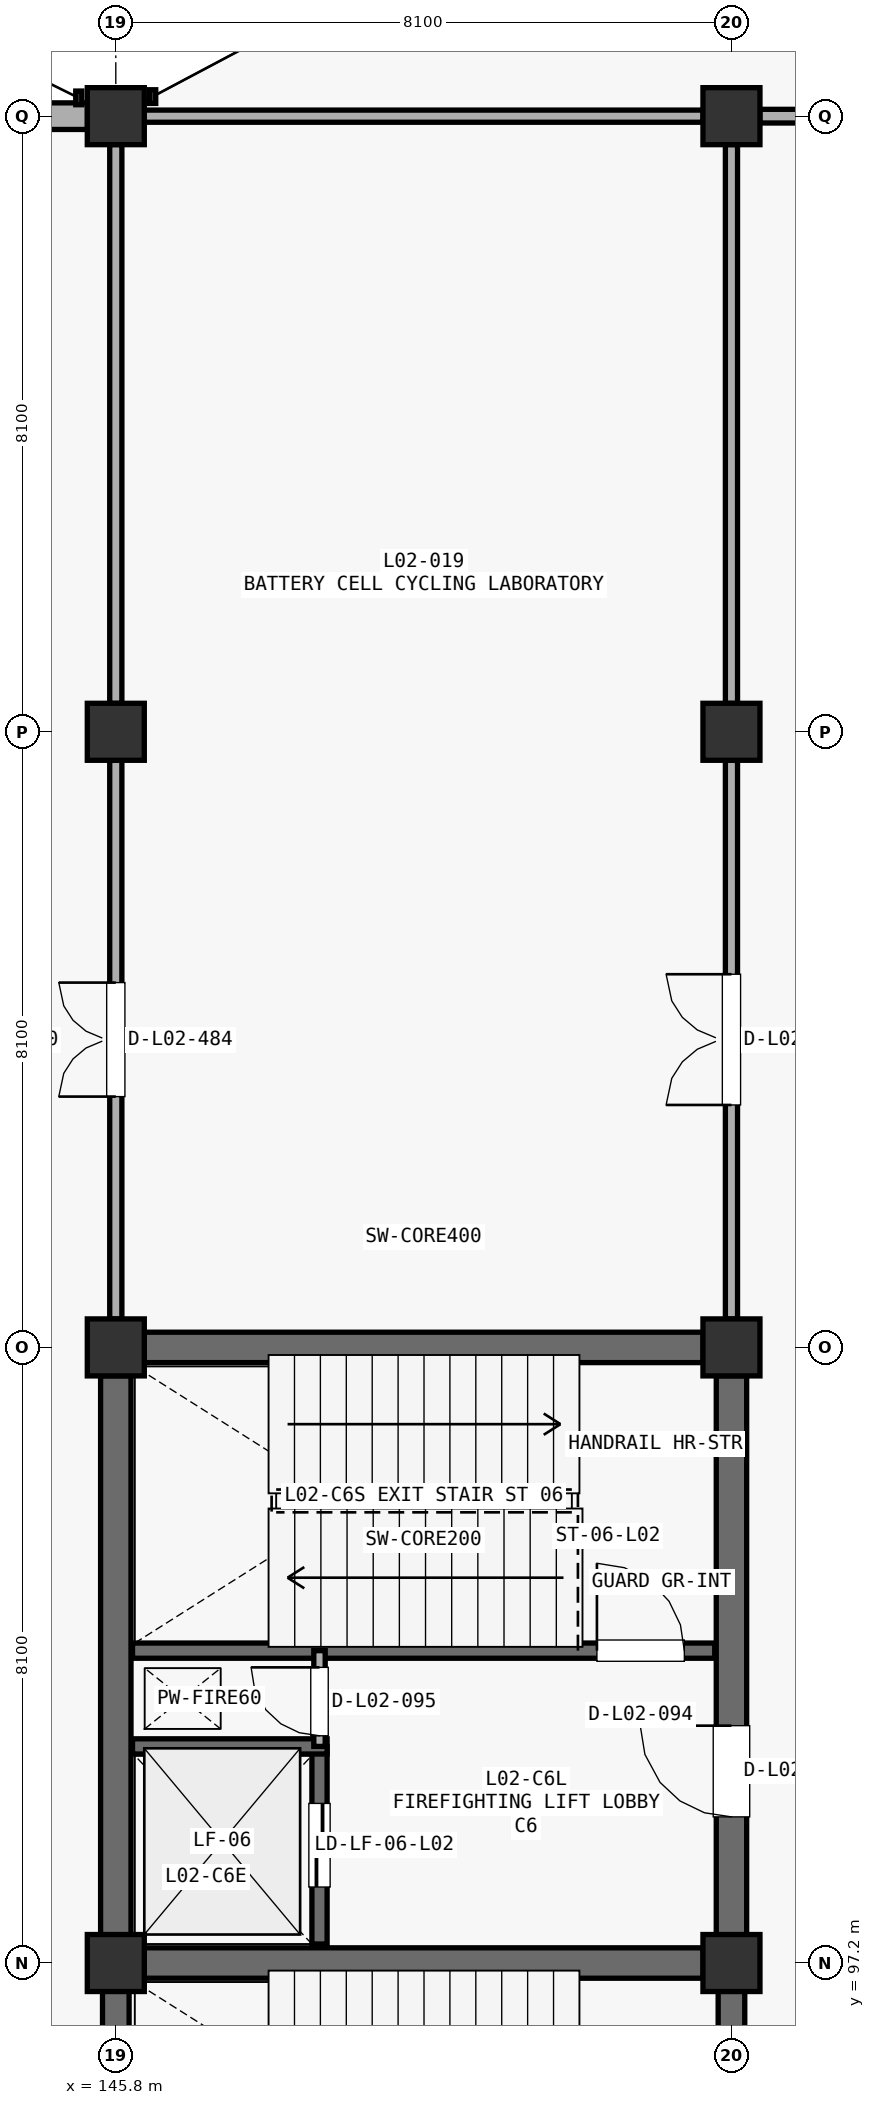
"""IFC4 building model, lengths in metres.
Left out: names, types, materials, properties, quantities, classifications, styles, units other than length and angle.
Written with IfcOpenShell. Run it as: python <this file> out.ifc"""

import sys

from ifc_helpers import new_model, si_unit, direction, frame, frame_2d, origin, origin_2d, place, context, subcontext, project, spatial, rectangle, extrude, element, fill, save


model = new_model("IFC4")
c1 = context("Model", 3, precision=1e-05, world=origin(), true_north=direction((0.0, 1.0)))
c2 = subcontext(c1, "Body", "Model", "MODEL_VIEW")
j1 = project(units=[si_unit("LENGTHUNIT", "METRE"), si_unit("PLANEANGLEUNIT", "RADIAN")], contexts=[c1])
p1 = place(None, origin())
s1 = spatial("IfcSite", under=j1, at=p1, CompositionType="ELEMENT")
p2 = place(p1, origin())
s2 = spatial("IfcBuilding", under=s1, at=p2, CompositionType="ELEMENT")
p3 = place(p2, frame((0.0, 0.0, 9.69)))
s3 = spatial("IfcBuildingStorey", under=s2, at=p3, CompositionType="ELEMENT", Elevation=9.69)
for number, where, z_axis, x_axis in (
    (1, (145.8, 97.2, 0.0), (0.0, 0.0, 1.0), (1.0, 0.0, 0.0)),
    (2, (145.8, 105.3, 0.0), (0.0, 0.0, 1.0), (1.0, 0.0, 0.0)),
    (3, (145.8, 113.4, 0.0), (0.0, 0.0, 1.0), (1.0, 0.0, 0.0)),
    (4, (145.8, 121.5, 0.0), (0.0, 0.0, 1.0), (1.0, 0.0, 0.0)),
    (5, (153.9, 97.2, 0.0), (0.0, 0.0, 1.0), (1.0, 0.0, 0.0)),
    (6, (153.9, 105.3, 0.0), (0.0, 0.0, 1.0), (1.0, 0.0, 0.0)),
    (7, (153.9, 113.4, 0.0), (0.0, 0.0, 1.0), (1.0, 0.0, 0.0)),
    (8, (153.9, 121.5, 0.0), (0.0, 0.0, 1.0), (1.0, 0.0, 0.0)),
):
    element("IfcColumn", number, at=place(p3, frame(where, z_axis=z_axis, x_axis=x_axis)), inside=s3, PredefinedType="COLUMN", context=c2, shape_type="SweptSolid", body=[
        extrude(rectangle(XDim=0.75, YDim=0.75, at=origin_2d()), origin(), (0.0, 0.0, 1.0), 4.42),
    ])
p4 = place(p3, frame((138.073, 121.5, 0.0), z_axis=(0.0, 0.0, 1.0), x_axis=(1.0, 0.0, 0.0)))
e9 = element("IfcWall", 9, at=p4, inside=s3, PredefinedType="STANDARD", context=c2, shape_type="SweptSolid", body=[
    extrude(rectangle(XDim=7.354, YDim=0.35, at=frame_2d((3.677, 0.0))), origin(), (0.0, 0.0, 1.0), 3.392),
])
p5 = place(p4, frame((2.652, 0.0, 0.85)))
e10 = element("IfcOpeningElement", 10, at=p5, cuts=e9, PredefinedType="OPENING", context=c2, shape_type="SweptSolid", body=[
    extrude(rectangle(XDim=2.05, YDim=1.6, at=frame_2d((1.025, 0.8))), frame((0.0, 0.185, 0.0), z_axis=(0.0, -1.0, 0.0), x_axis=(1.0, 0.0, 0.0)), (0.0, 0.0, 1.0), 0.37),
])
for number, where, z_axis, x_axis in (
    (11, (146.173, 105.3, 0.0), (0.0, 0.0, 1.0), (1.0, 0.0, 0.0)),
    (12, (145.8, 97.573, 0.0), (0.0, 0.0, 1.0), (0.0, 1.0, 0.0)),
):
    element("IfcWall", number, at=place(p3, frame(where, z_axis=z_axis, x_axis=x_axis)), inside=s3, PredefinedType="SHEAR", context=c2, shape_type="SweptSolid", body=[
        extrude(rectangle(XDim=7.354, YDim=0.4, at=frame_2d((3.677, 0.0))), origin(), (0.0, 0.0, 1.0), 4.142),
    ])
p6 = place(p3, frame((153.9, 97.573, 0.0), z_axis=(0.0, 0.0, 1.0), x_axis=(0.0, 1.0, 0.0)))
e13 = element("IfcWall", 13, at=p6, inside=s3, PredefinedType="SHEAR", context=c2, shape_type="SweptSolid", body=[
    extrude(rectangle(XDim=7.354, YDim=0.4, at=frame_2d((3.677, 0.0))), origin(), (0.0, 0.0, 1.0), 4.142),
])
p7 = place(p6, frame((1.55, 0.0, 0.0)))
e14 = element("IfcOpeningElement", 14, at=p7, cuts=e13, PredefinedType="OPENING", context=c2, shape_type="SweptSolid", body=[
    extrude(rectangle(XDim=1.2, YDim=2.2, at=frame_2d((0.6, 1.1))), frame((0.0, 0.21, 0.0), z_axis=(0.0, -1.0, 0.0), x_axis=(1.0, 0.0, 0.0)), (0.0, 0.0, 1.0), 0.42),
])
p8 = place(p3, frame((146.173, 97.2, 0.0), z_axis=(0.0, 0.0, 1.0), x_axis=(1.0, 0.0, 0.0)))
e15 = element("IfcWall", 15, at=p8, inside=s3, PredefinedType="SHEAR", context=c2, shape_type="SweptSolid", body=[
    extrude(rectangle(XDim=7.354, YDim=0.4, at=frame_2d((3.677, 0.0))), origin(), (0.0, 0.0, 1.0), 4.142),
])
p9 = place(p3, frame((146.02, 101.31, 0.0), z_axis=(0.0, 0.0, 1.0), x_axis=(1.0, 0.0, 0.0)))
e16 = element("IfcWall", 16, at=p9, inside=s3, PredefinedType="SHEAR", context=c2, shape_type="SweptSolid", body=[
    extrude(rectangle(XDim=7.66, YDim=0.2, at=frame_2d((3.83, 0.0))), origin(), (0.0, 0.0, 1.0), 4.142),
])
p10 = place(p9, frame((6.11, 0.0, 0.0)))
e17 = element("IfcOpeningElement", 17, at=p10, cuts=e16, PredefinedType="OPENING", context=c2, shape_type="SweptSolid", body=[
    extrude(rectangle(XDim=1.15, YDim=2.2, at=frame_2d((0.575, 1.1))), frame((0.0, 0.11, 0.0), z_axis=(0.0, -1.0, 0.0), x_axis=(1.0, 0.0, 0.0)), (0.0, 0.0, 1.0), 0.22),
])
p11 = place(p3, frame((148.48, 97.45, 0.0), z_axis=(0.0, 0.0, 1.0), x_axis=(0.0, 1.0, 0.0)))
e18 = element("IfcWall", 18, at=p11, inside=s3, PredefinedType="SHEAR", context=c2, shape_type="SweptSolid", body=[
    extrude(rectangle(XDim=2.6, YDim=0.2, at=frame_2d((1.3, 0.0))), origin(), (0.0, 0.0, 1.0), 4.142),
])
p12 = place(p11, frame((0.75, 0.0, 0.0)))
e19 = element("IfcOpeningElement", 19, at=p12, cuts=e18, PredefinedType="OPENING", context=c2, shape_type="SweptSolid", body=[
    extrude(rectangle(XDim=1.1, YDim=2.2, at=frame_2d((0.55, 1.1))), frame((0.0, 0.11, 0.0), z_axis=(0.0, -1.0, 0.0), x_axis=(1.0, 0.0, 0.0)), (0.0, 0.0, 1.0), 0.22),
])
p13 = place(p3, frame((146.02, 100.05, 0.0), z_axis=(0.0, 0.0, 1.0), x_axis=(1.0, 0.0, 0.0)))
e20 = element("IfcWall", 20, at=p13, inside=s3, PredefinedType="SHEAR", context=c2, shape_type="SweptSolid", body=[
    extrude(rectangle(XDim=2.56, YDim=0.2, at=frame_2d((1.28, 0.0))), origin(), (0.0, 0.0, 1.0), 4.142),
])
p14 = place(p3, frame((148.48, 100.05, 0.0), z_axis=(0.0, 0.0, 1.0), x_axis=(0.0, 1.0, 0.0)))
e21 = element("IfcWall", 21, at=p14, inside=s3, PredefinedType="PARTITIONING", context=c2, shape_type="SweptSolid", body=[
    extrude(rectangle(XDim=1.26, YDim=0.15, at=frame_2d((0.63, 0.0))), origin(), (0.0, 0.0, 1.0), 4.142),
])
p15 = place(p14, frame((0.14, 0.0, 0.0)))
e22 = element("IfcOpeningElement", 22, at=p15, cuts=e21, PredefinedType="OPENING", context=c2, shape_type="SweptSolid", body=[
    extrude(rectangle(XDim=0.9, YDim=2.15, at=frame_2d((0.45, 1.075))), frame((0.0, 0.085, 0.0), z_axis=(0.0, -1.0, 0.0), x_axis=(1.0, 0.0, 0.0)), (0.0, 0.0, 1.0), 0.17),
])
p16 = place(p3, frame((145.8, 89.473, 0.0), z_axis=(0.0, 0.0, 1.0), x_axis=(0.0, 1.0, 0.0)))
e23 = element("IfcWall", 23, at=p16, inside=s3, PredefinedType="SHEAR", context=c2, shape_type="SweptSolid", body=[
    extrude(rectangle(XDim=7.354, YDim=0.35, at=frame_2d((3.677, 0.0))), origin(), (0.0, 0.0, 1.0), 4.142),
])
p17 = place(p3, frame((153.9, 89.473, 0.0), z_axis=(0.0, 0.0, 1.0), x_axis=(0.0, 1.0, 0.0)))
e24 = element("IfcWall", 24, at=p17, inside=s3, PredefinedType="SHEAR", context=c2, shape_type="SweptSolid", body=[
    extrude(rectangle(XDim=7.354, YDim=0.35, at=frame_2d((3.677, 0.0))), origin(), (0.0, 0.0, 1.0), 4.142),
])
p18 = place(p17, frame((1.55, 0.0, 0.0)))
e25 = element("IfcOpeningElement", 25, at=p18, cuts=e24, PredefinedType="OPENING", context=c2, shape_type="SweptSolid", body=[
    extrude(rectangle(XDim=1.2, YDim=2.2, at=frame_2d((0.6, 1.1))), frame((0.0, 0.185, 0.0), z_axis=(0.0, -1.0, 0.0), x_axis=(1.0, 0.0, 0.0)), (0.0, 0.0, 1.0), 0.37),
])
p19 = place(p3, frame((145.8, 105.673, 0.0), z_axis=(0.0, 0.0, 1.0), x_axis=(0.0, 1.0, 0.0)))
e26 = element("IfcWall", 26, at=p19, inside=s3, PredefinedType="PARTITIONING", context=c2, shape_type="SweptSolid", body=[
    extrude(rectangle(XDim=7.354, YDim=0.16, at=frame_2d((3.677, 0.0))), origin(), (0.0, 0.0, 1.0), 3.542),
])
p20 = place(p19, frame((2.927, 0.0, 0.0)))
e27 = element("IfcOpeningElement", 27, at=p20, cuts=e26, PredefinedType="OPENING", context=c2, shape_type="SweptSolid", body=[
    extrude(rectangle(XDim=1.5, YDim=2.2, at=frame_2d((0.75, 1.1))), frame((0.0, 0.09, 0.0), z_axis=(0.0, -1.0, 0.0), x_axis=(1.0, 0.0, 0.0)), (0.0, 0.0, 1.0), 0.18),
])
p21 = place(p3, frame((145.8, 113.773, 0.0), z_axis=(0.0, 0.0, 1.0), x_axis=(0.0, 1.0, 0.0)))
e28 = element("IfcWall", 28, at=p21, inside=s3, PredefinedType="PARTITIONING", context=c2, shape_type="SweptSolid", body=[
    extrude(rectangle(XDim=7.354, YDim=0.16, at=frame_2d((3.677, 0.0))), origin(), (0.0, 0.0, 1.0), 3.292),
])
p22 = place(p3, frame((153.9, 105.673, 0.0), z_axis=(0.0, 0.0, 1.0), x_axis=(0.0, 1.0, 0.0)))
e29 = element("IfcWall", 29, at=p22, inside=s3, PredefinedType="PARTITIONING", context=c2, shape_type="SweptSolid", body=[
    extrude(rectangle(XDim=7.354, YDim=0.16, at=frame_2d((3.677, 0.0))), origin(), (0.0, 0.0, 1.0), 3.192),
])
p23 = place(p22, frame((2.817, 0.0, 0.0)))
e30 = element("IfcOpeningElement", 30, at=p23, cuts=e29, PredefinedType="OPENING", context=c2, shape_type="SweptSolid", body=[
    extrude(rectangle(XDim=1.72, YDim=2.3, at=frame_2d((0.86, 1.15))), frame((0.0, 0.09, 0.0), z_axis=(0.0, -1.0, 0.0), x_axis=(1.0, 0.0, 0.0)), (0.0, 0.0, 1.0), 0.18),
])
p24 = place(p3, frame((153.9, 113.773, 0.0), z_axis=(0.0, 0.0, 1.0), x_axis=(0.0, 1.0, 0.0)))
e31 = element("IfcWall", 31, at=p24, inside=s3, PredefinedType="PARTITIONING", context=c2, shape_type="SweptSolid", body=[
    extrude(rectangle(XDim=7.354, YDim=0.16, at=frame_2d((3.677, 0.0))), origin(), (0.0, 0.0, 1.0), 3.392),
])
p25 = place(p3, frame((146.173, 121.5, 0.0), z_axis=(0.0, 0.0, 1.0), x_axis=(1.0, 0.0, 0.0)))
e32 = element("IfcWall", 32, at=p25, inside=s3, PredefinedType="PARTITIONING", context=c2, shape_type="SweptSolid", body=[
    extrude(rectangle(XDim=7.354, YDim=0.16, at=frame_2d((3.677, 0.0))), origin(), (0.0, 0.0, 1.0), 3.492),
])
p26 = place(p3, frame((154.273, 121.5, 0.0), z_axis=(0.0, 0.0, 1.0), x_axis=(1.0, 0.0, 0.0)))
e33 = element("IfcWall", 33, at=p26, inside=s3, PredefinedType="PARTITIONING", context=c2, shape_type="SweptSolid", body=[
    extrude(rectangle(XDim=7.354, YDim=0.18, at=frame_2d((3.677, 0.0))), origin(), (0.0, 0.0, 1.0), 3.542),
])
p27 = place(p26, frame((2.777, 0.0, 0.0)))
e34 = element("IfcOpeningElement", 34, at=p27, cuts=e33, PredefinedType="OPENING", context=c2, shape_type="SweptSolid", body=[
    extrude(rectangle(XDim=1.8, YDim=2.2, at=frame_2d((0.9, 1.1))), frame((0.0, 0.1, 0.0), z_axis=(0.0, -1.0, 0.0), x_axis=(1.0, 0.0, 0.0)), (0.0, 0.0, 1.0), 0.2),
])
p28 = place(p7, origin())
e35 = element("IfcDoor", 35, at=p28, inside=s3, OperationType="SINGLE_SWING_RIGHT", PredefinedType="DOOR", context=c2, shape_type="SweptSolid", body=[
    extrude(rectangle(XDim=1.2, YDim=2.2, at=frame_2d((0.6, 1.1))), frame((0.0, 0.025, 0.0), z_axis=(0.0, -1.0, 0.0), x_axis=(1.0, 0.0, 0.0)), (0.0, 0.0, 1.0), 0.05),
])
fill(e14, e35)
p29 = place(p10, origin())
e36 = element("IfcDoor", 36, at=p29, inside=s3, OperationType="SINGLE_SWING_LEFT", PredefinedType="DOOR", context=c2, shape_type="SweptSolid", body=[
    extrude(rectangle(XDim=1.15, YDim=2.2, at=frame_2d((0.575, 1.1))), frame((0.0, 0.025, 0.0), z_axis=(0.0, -1.0, 0.0), x_axis=(1.0, 0.0, 0.0)), (0.0, 0.0, 1.0), 0.05),
])
fill(e17, e36)
p30 = place(p12, origin())
e37 = element("IfcDoor", 37, at=p30, inside=s3, OperationType="SLIDING_TO_LEFT", PredefinedType="DOOR", context=c2, shape_type="SweptSolid", body=[
    extrude(rectangle(XDim=1.1, YDim=2.2, at=frame_2d((0.55, 1.1))), frame((0.0, 0.025, 0.0), z_axis=(0.0, -1.0, 0.0), x_axis=(1.0, 0.0, 0.0)), (0.0, 0.0, 1.0), 0.05),
])
fill(e19, e37)
p31 = place(p15, origin())
e38 = element("IfcDoor", 38, at=p31, inside=s3, OperationType="SINGLE_SWING_RIGHT", PredefinedType="DOOR", context=c2, shape_type="SweptSolid", body=[
    extrude(rectangle(XDim=0.9, YDim=2.15, at=frame_2d((0.45, 1.075))), frame((0.0, 0.025, 0.0), z_axis=(0.0, -1.0, 0.0), x_axis=(1.0, 0.0, 0.0)), (0.0, 0.0, 1.0), 0.05),
])
fill(e22, e38)
p32 = place(p20, origin())
e39 = element("IfcDoor", 39, at=p32, inside=s3, OperationType="DOUBLE_SWING_LEFT", PredefinedType="DOOR", context=c2, shape_type="SweptSolid", body=[
    extrude(rectangle(XDim=1.5, YDim=2.2, at=frame_2d((0.75, 1.1))), frame((0.0, 0.025, 0.0), z_axis=(0.0, -1.0, 0.0), x_axis=(1.0, 0.0, 0.0)), (0.0, 0.0, 1.0), 0.05),
])
fill(e27, e39)
p33 = place(p23, origin())
e40 = element("IfcDoor", 40, at=p33, inside=s3, OperationType="DOUBLE_SWING_LEFT", PredefinedType="DOOR", context=c2, shape_type="SweptSolid", body=[
    extrude(rectangle(XDim=1.72, YDim=2.3, at=frame_2d((0.86, 1.15))), frame((0.0, 0.025, 0.0), z_axis=(0.0, -1.0, 0.0), x_axis=(1.0, 0.0, 0.0)), (0.0, 0.0, 1.0), 0.05),
])
fill(e30, e40)
save(model, sys.argv[1])
